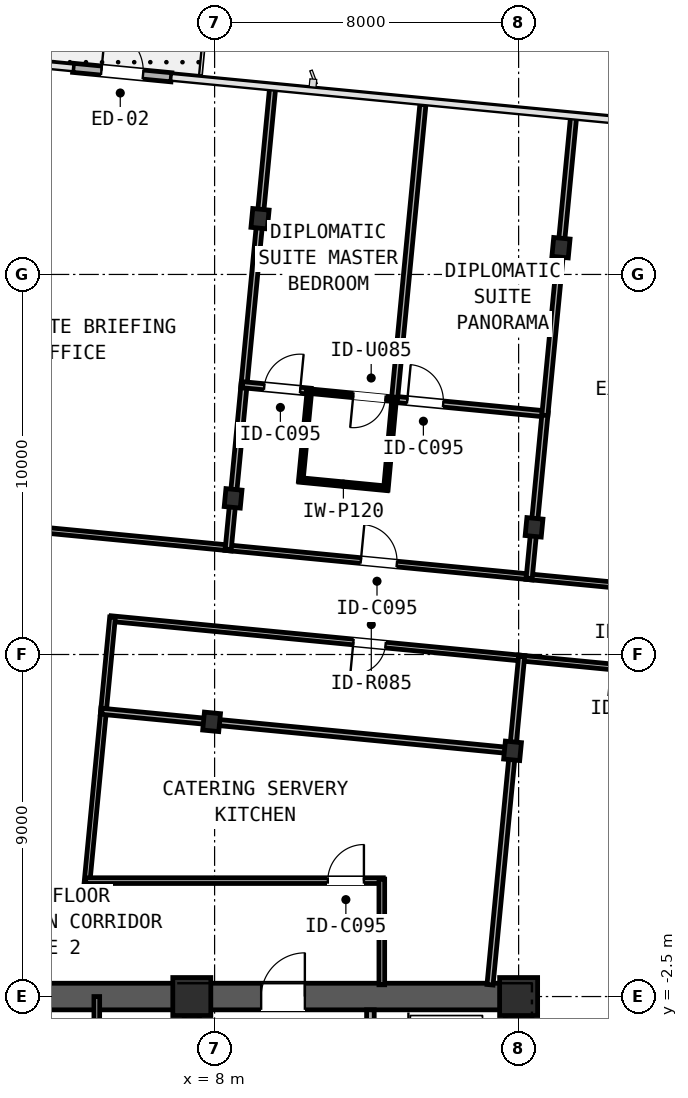
"""IFC4 building model, lengths in metres.
Left out: names, types, materials, properties, quantities, classifications, styles, units other than length and angle.
Written with IfcOpenShell. Run it as: python <this file> out.ifc"""

import sys

from ifc_helpers import new_model, si_unit, direction, frame, frame_2d, origin, origin_2d, place, context, subcontext, project, spatial, rectangle, i_section, extrude, element, fill, save


model = new_model("IFC4")
c1 = context("Model", 3, precision=1e-05, world=origin(), true_north=direction((0.0, 1.0)))
c2 = subcontext(c1, "Body", "Model", "MODEL_VIEW")
j1 = project(units=[si_unit("LENGTHUNIT", "METRE"), si_unit("PLANEANGLEUNIT", "RADIAN")], contexts=[c1])
p1 = place(None, origin())
s1 = spatial("IfcSite", under=j1, at=p1, CompositionType="ELEMENT")
p2 = place(p1, origin())
s2 = spatial("IfcBuilding", under=s1, at=p2, CompositionType="ELEMENT")
p3 = place(p2, frame((0.0, 0.0, 163.5)))
s3 = spatial("IfcBuildingStorey", under=s2, at=p3, CompositionType="ELEMENT", Elevation=163.5)
p4 = place(p3, frame((-16.35, -2.5, 0.0), z_axis=(0.0, 0.0, 1.0), x_axis=(1.0, 0.0, 0.0)))
e1 = element("IfcWall", 1, at=p4, inside=s3, PredefinedType="SHEAR", context=c2, shape_type="SweptSolid", body=[
    extrude(rectangle(XDim=32.7, YDim=0.7, at=frame_2d((16.35, 0.0))), origin(), (0.0, 0.0, 1.0), 2.91),
])
p5 = place(p4, frame((5.975, 0.0, 0.0)))
e2 = element("IfcOpeningElement", 2, at=p5, cuts=e1, PredefinedType="OPENING", context=c2, shape_type="SweptSolid", body=[
    extrude(rectangle(XDim=1.15, YDim=2.0, at=frame_2d((0.575, 1.0))), frame((0.0, 0.36, 0.0), z_axis=(0.0, -1.0, 0.0), x_axis=(1.0, 0.0, 0.0)), (0.0, 0.0, 1.0), 0.72),
])
p6 = place(p4, frame((15.55, 0.0, 0.0)))
e3 = element("IfcOpeningElement", 3, at=p6, cuts=e1, PredefinedType="OPENING", context=c2, shape_type="SweptSolid", body=[
    extrude(rectangle(XDim=1.6, YDim=2.0, at=frame_2d((0.8, 1.0))), frame((0.0, 0.36, 0.0), z_axis=(0.0, -1.0, 0.0), x_axis=(1.0, 0.0, 0.0)), (0.0, 0.0, 1.0), 0.72),
])
p7 = place(p4, frame((25.575, 0.0, 0.0)))
e4 = element("IfcOpeningElement", 4, at=p7, cuts=e1, PredefinedType="OPENING", context=c2, shape_type="SweptSolid", body=[
    extrude(rectangle(XDim=1.15, YDim=2.0, at=frame_2d((0.575, 1.0))), frame((0.0, 0.36, 0.0), z_axis=(0.0, -1.0, 0.0), x_axis=(1.0, 0.0, 0.0)), (0.0, 0.0, 1.0), 0.72),
])
p8 = place(p3, frame((16.0, -12.65, 0.0), z_axis=(0.0, 0.0, 1.0), x_axis=(0.0, 1.0, 0.0)))
e5 = element("IfcWall", 5, at=p8, inside=s3, PredefinedType="SHEAR", context=c2, shape_type="SweptSolid", body=[
    extrude(rectangle(XDim=9.8, YDim=0.7, at=frame_2d((4.9, 0.0))), origin(), (0.0, 0.0, 1.0), 2.91),
])
p9 = place(p3, frame((7.4, -12.65, 0.0), z_axis=(0.0, 0.0, 1.0), x_axis=(0.0, 1.0, 0.0)))
e6 = element("IfcWall", 6, at=p9, inside=s3, PredefinedType="SHEAR", context=c2, shape_type="SweptSolid", body=[
    extrude(rectangle(XDim=9.8, YDim=0.4, at=frame_2d((4.9, 0.0))), origin(), (0.0, 0.0, 1.0), 3.19),
])
for number, where, z_axis, x_axis in (
    (7, (7.4, -2.5, 0.0), (0.0, 0.0, 1.0), (1.0, 0.0, 0.0)),
    (8, (16.0, -2.5, 0.0), (0.0, 0.0, 1.0), (1.0, 0.0, 0.0)),
):
    element("IfcColumn", number, at=place(p3, frame(where, z_axis=z_axis, x_axis=x_axis)), inside=s3, PredefinedType="COLUMN", context=c2, shape_type="SweptSolid", body=[
        extrude(rectangle(XDim=1.0, YDim=1.0, at=origin_2d()), origin(), (0.0, 0.0, 1.0), 3.45),
    ])
for number, where, z_axis, x_axis in (
    (9, (7.921, 4.728, 0.0), (0.0, 0.0, 1.0), (0.995, -0.096, 0.0)),
    (10, (8.487, 10.609, 0.0), (0.0, 0.0, 1.0), (0.995, -0.096, 0.0)),
):
    element("IfcColumn", number, at=place(p3, frame(where, z_axis=z_axis, x_axis=x_axis)), inside=s3, PredefinedType="COLUMN", context=c2, shape_type="SweptSolid", body=[
        extrude(i_section(OverallWidth=0.424, OverallDepth=0.474, WebThickness=0.048, FlangeThickness=0.077, FilletRadius=0.031, at=origin_2d()), origin(), (0.0, 0.0, 1.0), 3.45),
    ])
p10 = place(p3, frame((9.195, 17.967, 0.0), z_axis=(0.0, 0.0, 1.0), x_axis=(0.995396198367, -0.09584575252, 0.0)))
e11 = element("IfcColumn", 11, at=p10, inside=s3, PredefinedType="COLUMN", context=c2, shape_type="SweptSolid", body=[
    extrude(i_section(OverallWidth=0.432, OverallDepth=0.498, WebThickness=0.056, FlangeThickness=0.089, FilletRadius=0.031, at=origin_2d()), origin(), (0.0, 0.0, 1.0), 3.45),
])
for number, where, z_axis, x_axis in (
    (12, (15.84, 3.965, 0.0), (0.0, 0.0, 1.0), (0.995, -0.096, 0.0)),
    (13, (16.406, 9.846, 0.0), (0.0, 0.0, 1.0), (0.995, -0.096, 0.0)),
):
    element("IfcColumn", number, at=place(p3, frame(where, z_axis=z_axis, x_axis=x_axis)), inside=s3, PredefinedType="COLUMN", context=c2, shape_type="SweptSolid", body=[
        extrude(i_section(OverallWidth=0.424, OverallDepth=0.474, WebThickness=0.048, FlangeThickness=0.077, FilletRadius=0.031, at=origin_2d()), origin(), (0.0, 0.0, 1.0), 3.45),
    ])
p11 = place(p3, frame((17.115, 17.204, 0.0), z_axis=(0.0, 0.0, 1.0), x_axis=(0.995396198367, -0.09584575252, 0.0)))
e14 = element("IfcColumn", 14, at=p11, inside=s3, PredefinedType="COLUMN", context=c2, shape_type="SweptSolid", body=[
    extrude(i_section(OverallWidth=0.432, OverallDepth=0.498, WebThickness=0.056, FlangeThickness=0.089, FilletRadius=0.031, at=origin_2d()), origin(), (0.0, 0.0, 1.0), 3.45),
])
p12 = place(p3, frame((4.275, 21.937, 0.0), z_axis=(0.0, 0.0, 1.0), x_axis=(0.995394049959, -0.095868061976, 0.0)))
e15 = element("IfcWall", 15, at=p12, inside=s3, PredefinedType="STANDARD", context=c2, shape_type="SweptSolid", body=[
    extrude(rectangle(XDim=2.6, YDim=0.24, at=frame_2d((1.3, 0.0))), origin(), (0.0, 0.0, 1.0), 3.19),
])
p13 = place(p12, frame((0.75, 0.0, 0.0)))
e16 = element("IfcOpeningElement", 16, at=p13, cuts=e15, PredefinedType="OPENING", context=c2, shape_type="SweptSolid", body=[
    extrude(rectangle(XDim=1.1, YDim=2.15, at=frame_2d((0.55, 1.075))), frame((0.0, 0.13, 0.0), z_axis=(0.0, -1.0, 0.0), x_axis=(1.0, 0.0, 0.0)), (0.0, 0.0, 1.0), 0.26),
])
p14 = place(p3, frame((12.1, -5.2, 0.0), z_axis=(0.0, 0.0, 1.0), x_axis=(0.0, 1.0, 0.0)))
e17 = element("IfcWall", 17, at=p14, inside=s3, PredefinedType="PARTITIONING", context=c2, shape_type="SweptSolid", body=[
    extrude(rectangle(XDim=2.35, YDim=0.2, at=frame_2d((1.175, 0.0))), origin(), (0.0, 0.0, 1.0), 2.225),
])
p15 = place(p14, frame((0.825, 0.0, 0.0)))
e18 = element("IfcOpeningElement", 18, at=p15, cuts=e17, PredefinedType="OPENING", context=c2, shape_type="SweptSolid", body=[
    extrude(rectangle(XDim=0.85, YDim=2.05, at=frame_2d((0.425, 1.025))), frame((0.0, 0.11, 0.0), z_axis=(0.0, -1.0, 0.0), x_axis=(1.0, 0.0, 0.0)), (0.0, 0.0, 1.0), 0.22),
])
p16 = place(p3, frame((4.9, -6.0, 0.0), z_axis=(0.0, 0.0, 1.0), x_axis=(0.0, 1.0, 0.0)))
e19 = element("IfcWall", 19, at=p16, inside=s3, PredefinedType="PARTITIONING", context=c2, shape_type="SweptSolid", body=[
    extrude(rectangle(XDim=3.5, YDim=0.15, at=frame_2d((1.75, 0.0))), origin(), (0.0, 0.0, 1.0), 2.225),
])
p17 = place(p3, frame((-7.559, 10.84, 0.0), z_axis=(0.0, 0.0, 1.0), x_axis=(0.995396443768, -0.095843203903, 0.0)))
e20 = element("IfcWall", 20, at=p17, inside=s3, PredefinedType="PARTITIONING", context=c2, shape_type="SweptSolid", body=[
    extrude(rectangle(XDim=16.076, YDim=0.15, at=frame_2d((8.038, 0.0))), origin(), (0.0, 0.0, 1.0), 2.479),
])
p18 = place(p17, frame((3.532, 0.0, 0.0)))
e21 = element("IfcOpeningElement", 21, at=p18, cuts=e20, PredefinedType="OPENING", context=c2, shape_type="SweptSolid", body=[
    extrude(rectangle(XDim=0.95, YDim=2.15, at=frame_2d((0.475, 1.075))), frame((0.0, 0.085, 0.0), z_axis=(0.0, -1.0, 0.0), x_axis=(1.0, 0.0, 0.0)), (0.0, 0.0, 1.0), 0.17),
])
p19 = place(p3, frame((8.28, 9.314, 0.0), z_axis=(0.0, 0.0, 1.0), x_axis=(0.995395467524, -0.095853342309, 0.0)))
e22 = element("IfcWall", 22, at=p19, inside=s3, PredefinedType="PARTITIONING", context=c2, shape_type="SweptSolid", body=[
    extrude(rectangle(XDim=8.12, YDim=0.15, at=frame_2d((4.06, 0.0))), origin(), (0.0, 0.0, 1.0), 2.479),
])
p20 = place(p19, frame((3.585, 0.0, 0.0)))
e23 = element("IfcOpeningElement", 23, at=p20, cuts=e22, PredefinedType="OPENING", context=c2, shape_type="SweptSolid", body=[
    extrude(rectangle(XDim=0.95, YDim=2.15, at=frame_2d((0.475, 1.075))), frame((0.0, 0.085, 0.0), z_axis=(0.0, -1.0, 0.0), x_axis=(1.0, 0.0, 0.0)), (0.0, 0.0, 1.0), 0.17),
])
p21 = place(p3, frame((16.199, 8.552, 0.0), z_axis=(0.0, 0.0, 1.0), x_axis=(0.995391104887, -0.095898635608, 0.0)))
e24 = element("IfcWall", 24, at=p21, inside=s3, PredefinedType="PARTITIONING", context=c2, shape_type="SweptSolid", body=[
    extrude(rectangle(XDim=3.722, YDim=0.15, at=frame_2d((1.861, 0.0))), origin(), (0.0, 0.0, 1.0), 2.479),
])
p22 = place(p21, frame((2.457, 0.0, 0.0)))
e25 = element("IfcOpeningElement", 25, at=p22, cuts=e24, PredefinedType="OPENING", context=c2, shape_type="SweptSolid", body=[
    extrude(rectangle(XDim=0.95, YDim=2.15, at=frame_2d((0.475, 1.075))), frame((0.0, 0.085, 0.0), z_axis=(0.0, -1.0, 0.0), x_axis=(1.0, 0.0, 0.0)), (0.0, 0.0, 1.0), 0.17),
])
p23 = place(p3, frame((16.156, 6.396, 0.0), z_axis=(0.0, 0.0, 1.0), x_axis=(-0.99539478422, 0.095860437863, 0.0)))
e26 = element("IfcWall", 26, at=p23, inside=s3, PredefinedType="PARTITIONING", context=c2, shape_type="SweptSolid", body=[
    extrude(rectangle(XDim=10.936, YDim=0.15, at=frame_2d((5.468, 0.0))), origin(), (0.0, 0.0, 1.0), 2.479),
])
p24 = place(p23, frame((3.675, 0.0, 0.0)))
e27 = element("IfcOpeningElement", 27, at=p24, cuts=e26, PredefinedType="OPENING", context=c2, shape_type="SweptSolid", body=[
    extrude(rectangle(XDim=0.85, YDim=2.05, at=frame_2d((0.425, 1.025))), frame((0.0, 0.085, 0.0), z_axis=(0.0, -1.0, 0.0), x_axis=(1.0, 0.0, 0.0)), (0.0, 0.0, 1.0), 0.17),
])
p25 = place(p3, frame((5.314, 7.48, 0.0), z_axis=(0.0, 0.0, 1.0), x_axis=(-0.09587519517, -0.995393362923, 0.0)))
e28 = element("IfcWall", 28, at=p25, inside=s3, PredefinedType="PARTITIONING", context=c2, shape_type="SweptSolid", body=[
    extrude(rectangle(XDim=2.572, YDim=0.15, at=frame_2d((1.286, 0.0))), origin(), (0.0, 0.0, 1.0), 2.479),
])
p26 = place(p3, frame((5.084, 5.083, 0.0), z_axis=(0.0, 0.0, 1.0), x_axis=(-0.095867331855, -0.995394120277, 0.0)))
e29 = element("IfcWall", 29, at=p26, inside=s3, PredefinedType="PARTITIONING", context=c2, shape_type="SweptSolid", body=[
    extrude(rectangle(XDim=4.594, YDim=0.15, at=frame_2d((2.297, 0.0))), origin(), (0.0, 0.0, 1.0), 2.479),
])
p27 = place(p3, frame((4.607, 0.55, 0.0), z_axis=(0.0, 0.0, 1.0), x_axis=(1.0, 0.0, 0.0)))
e30 = element("IfcWall", 30, at=p27, inside=s3, PredefinedType="PARTITIONING", context=c2, shape_type="SweptSolid", body=[
    extrude(rectangle(XDim=7.833, YDim=0.15, at=frame_2d((3.917, 0.0))), origin(), (0.0, 0.0, 1.0), 2.479),
])
p28 = place(p27, frame((6.372, 0.0, 0.0)))
e31 = element("IfcOpeningElement", 31, at=p28, cuts=e30, PredefinedType="OPENING", context=c2, shape_type="SweptSolid", body=[
    extrude(rectangle(XDim=0.95, YDim=2.15, at=frame_2d((0.475, 1.075))), frame((0.0, 0.085, 0.0), z_axis=(0.0, -1.0, 0.0), x_axis=(1.0, 0.0, 0.0)), (0.0, 0.0, 1.0), 0.17),
])
p29 = place(p3, frame((12.4, 0.59, 0.0), z_axis=(0.0, 0.0, 1.0), x_axis=(0.0, -1.0, 0.0)))
e32 = element("IfcWall", 32, at=p29, inside=s3, PredefinedType="PARTITIONING", context=c2, shape_type="SweptSolid", body=[
    extrude(rectangle(XDim=2.78, YDim=0.15, at=frame_2d((1.39, 0.0))), origin(), (0.0, 0.0, 1.0), 2.225),
])
p30 = place(p3, frame((19.698, 6.055, 0.0), z_axis=(0.0, 0.0, 1.0), x_axis=(-0.995397364202, 0.095833644092, 0.0)))
e33 = element("IfcWall", 33, at=p30, inside=s3, PredefinedType="PARTITIONING", context=c2, shape_type="SweptSolid", body=[
    extrude(rectangle(XDim=3.722, YDim=0.15, at=frame_2d((1.861, 0.0))), origin(), (0.0, 0.0, 1.0), 2.479),
])
p31 = place(p30, frame((0.315, 0.0, 0.0)))
e34 = element("IfcOpeningElement", 34, at=p31, cuts=e33, PredefinedType="OPENING", context=c2, shape_type="SweptSolid", body=[
    extrude(rectangle(XDim=0.95, YDim=2.15, at=frame_2d((0.475, 1.075))), frame((0.0, 0.085, 0.0), z_axis=(0.0, -1.0, 0.0), x_axis=(1.0, 0.0, 0.0)), (0.0, 0.0, 1.0), 0.17),
])
p32 = place(p3, frame((8.47, 10.433, 0.0), z_axis=(0.0, 0.0, 1.0), x_axis=(-0.095831494917, -0.995397571115, 0.0)))
e35 = element("IfcWall", 35, at=p32, inside=s3, PredefinedType="PARTITIONING", context=c2, shape_type="SweptSolid", body=[
    extrude(rectangle(XDim=1.172, YDim=0.16, at=frame_2d((0.586, 0.0))), origin(), (0.0, 0.0, 1.0), 2.479),
])
p33 = place(p3, frame((8.782, 13.677, 0.0), z_axis=(0.0, 0.0, 1.0), x_axis=(-0.095851667856, -0.995395628767, 0.0)))
e36 = element("IfcWall", 36, at=p33, inside=s3, PredefinedType="PARTITIONING", context=c2, shape_type="SweptSolid", body=[
    extrude(rectangle(XDim=2.906, YDim=0.16, at=frame_2d((1.453, 0.0))), origin(), (0.0, 0.0, 1.0), 2.479),
])
p34 = place(p3, frame((9.178, 17.791, 0.0), z_axis=(0.0, 0.0, 1.0), x_axis=(-0.095830387623, -0.995397677719, 0.0)))
e37 = element("IfcWall", 37, at=p34, inside=s3, PredefinedType="PARTITIONING", context=c2, shape_type="SweptSolid", body=[
    extrude(rectangle(XDim=4.298, YDim=0.16, at=frame_2d((2.149, 0.0))), origin(), (0.0, 0.0, 1.0), 2.479),
])
p35 = place(p3, frame((9.533, 21.47, 0.0), z_axis=(0.0, 0.0, 1.0), x_axis=(-0.095859866796, -0.995394839216, 0.0)))
e38 = element("IfcWall", 38, at=p35, inside=s3, PredefinedType="PARTITIONING", context=c2, shape_type="SweptSolid", body=[
    extrude(rectangle(XDim=3.344, YDim=0.16, at=frame_2d((1.672, 0.0))), origin(), (0.0, 0.0, 1.0), 3.19),
])
p36 = place(p3, frame((8.735, 13.599, 0.0), z_axis=(0.0, 0.0, 1.0), x_axis=(0.995394173932, -0.095866774755, 0.0)))
e39 = element("IfcWall", 39, at=p36, inside=s3, PredefinedType="PARTITIONING", context=c2, shape_type="SweptSolid", body=[
    extrude(rectangle(XDim=1.808, YDim=0.16, at=frame_2d((0.904, 0.0))), origin(), (0.0, 0.0, 1.0), 2.479),
])
p37 = place(p36, frame((0.574, 0.0, 0.0)))
e40 = element("IfcOpeningElement", 40, at=p37, cuts=e39, PredefinedType="OPENING", context=c2, shape_type="SweptSolid", body=[
    extrude(rectangle(XDim=0.95, YDim=2.15, at=frame_2d((0.475, 1.075))), frame((0.0, 0.09, 0.0), z_axis=(0.0, -1.0, 0.0), x_axis=(1.0, 0.0, 0.0)), (0.0, 0.0, 1.0), 0.18),
])
p38 = place(p3, frame((12.684, 13.218, 0.0), z_axis=(0.0, 0.0, 1.0), x_axis=(0.995396485523, -0.095842770251, 0.0)))
e41 = element("IfcWall", 41, at=p38, inside=s3, PredefinedType="PARTITIONING", context=c2, shape_type="SweptSolid", body=[
    extrude(rectangle(XDim=4.068, YDim=0.16, at=frame_2d((2.034, 0.0))), origin(), (0.0, 0.0, 1.0), 2.479),
])
p39 = place(p38, frame((0.386, 0.0, 0.0)))
e42 = element("IfcOpeningElement", 42, at=p39, cuts=e41, PredefinedType="OPENING", context=c2, shape_type="SweptSolid", body=[
    extrude(rectangle(XDim=0.95, YDim=2.15, at=frame_2d((0.475, 1.075))), frame((0.0, 0.09, 0.0), z_axis=(0.0, -1.0, 0.0), x_axis=(1.0, 0.0, 0.0)), (0.0, 0.0, 1.0), 0.18),
])
p40 = place(p3, frame((10.498, 13.469, 0.0), z_axis=(0.0, 0.0, 1.0), x_axis=(-0.095842578202, -0.995396504014, 0.0)))
e43 = element("IfcWall", 43, at=p40, inside=s3, PredefinedType="PARTITIONING", context=c2, shape_type="SweptSolid", body=[
    extrude(rectangle(XDim=2.43, YDim=0.12, at=frame_2d((1.215, 0.0))), origin(), (0.0, 0.0, 1.0), 3.19),
])
p41 = place(p3, frame((10.229, 11.094, 0.0), z_axis=(0.0, 0.0, 1.0), x_axis=(0.995403652262, -0.095768309281, 0.0)))
e44 = element("IfcWall", 44, at=p41, inside=s3, PredefinedType="PARTITIONING", context=c2, shape_type="SweptSolid", body=[
    extrude(rectangle(XDim=2.33, YDim=0.12, at=frame_2d((1.165, 0.0))), origin(), (0.0, 0.0, 1.0), 2.718),
])
p42 = place(p3, frame((12.505, 10.834, 0.0), z_axis=(0.0, 0.0, 1.0), x_axis=(0.091622673793, 0.995793796751, 0.0)))
e45 = element("IfcWall", 45, at=p42, inside=s3, PredefinedType="PARTITIONING", context=c2, shape_type="SweptSolid", body=[
    extrude(rectangle(XDim=2.43, YDim=0.12, at=frame_2d((1.215, 0.0))), origin(), (0.0, 0.0, 1.0), 2.718),
])
p43 = place(p3, frame((16.389, 9.671, 0.0), z_axis=(0.0, 0.0, 1.0), x_axis=(-0.095811626391, -0.995399483749, 0.0)))
e46 = element("IfcWall", 46, at=p43, inside=s3, PredefinedType="PARTITIONING", context=c2, shape_type="SweptSolid", body=[
    extrude(rectangle(XDim=1.172, YDim=0.16, at=frame_2d((0.586, 0.0))), origin(), (0.0, 0.0, 1.0), 2.479),
])
p44 = place(p3, frame((16.698, 12.872, 0.0), z_axis=(0.0, 0.0, 1.0), x_axis=(-0.095899197745, -0.995391050729, 0.0)))
e47 = element("IfcWall", 47, at=p44, inside=s3, PredefinedType="PARTITIONING", context=c2, shape_type="SweptSolid", body=[
    extrude(rectangle(XDim=2.864, YDim=0.16, at=frame_2d((1.432, 0.0))), origin(), (0.0, 0.0, 1.0), 2.479),
])
p45 = place(p3, frame((13.481, 20.97, 0.0), z_axis=(0.0, 0.0, 1.0), x_axis=(-0.095851985855, -0.995395598146, 0.0)))
e48 = element("IfcWall", 48, at=p45, inside=s3, PredefinedType="PARTITIONING", context=c2, shape_type="SweptSolid", body=[
    extrude(rectangle(XDim=7.832, YDim=0.16, at=frame_2d((3.916, 0.0))), origin(), (0.0, 0.0, 1.0), 2.558),
])
p46 = place(p3, frame((12.774, 13.21, 0.0), z_axis=(0.0, 0.0, 1.0), x_axis=(-0.995398273854, 0.095824195322, 0.0)))
e49 = element("IfcWall", 49, at=p46, inside=s3, PredefinedType="PARTITIONING", context=c2, shape_type="SweptSolid", body=[
    extrude(rectangle(XDim=2.372, YDim=0.12, at=frame_2d((1.186, 0.0))), origin(), (0.0, 0.0, 1.0), 2.718),
])
p47 = place(p46, frame((0.28, 0.0, 0.0)))
e50 = element("IfcOpeningElement", 50, at=p47, cuts=e49, PredefinedType="OPENING", context=c2, shape_type="SweptSolid", body=[
    extrude(rectangle(XDim=0.85, YDim=2.1, at=frame_2d((0.425, 1.05))), frame((0.0, 0.07, 0.0), z_axis=(0.0, -1.0, 0.0), x_axis=(1.0, 0.0, 0.0)), (0.0, 0.0, 1.0), 0.14),
])
p48 = place(p3, frame((17.098, 17.029, 0.0), z_axis=(0.0, 0.0, 1.0), x_axis=(-0.095856690152, -0.995395145132, 0.0)))
e51 = element("IfcWall", 51, at=p48, inside=s3, PredefinedType="PARTITIONING", context=c2, shape_type="SweptSolid", body=[
    extrude(rectangle(XDim=4.256, YDim=0.16, at=frame_2d((2.128, 0.0))), origin(), (0.0, 0.0, 1.0), 2.479),
])
p49 = place(p3, frame((17.452, 20.708, 0.0), z_axis=(0.0, 0.0, 1.0), x_axis=(-0.095859866796, -0.995394839216, 0.0)))
e52 = element("IfcWall", 52, at=p49, inside=s3, PredefinedType="PARTITIONING", context=c2, shape_type="SweptSolid", body=[
    extrude(rectangle(XDim=3.344, YDim=0.16, at=frame_2d((1.672, 0.0))), origin(), (0.0, 0.0, 1.0), 3.19),
])
p50 = place(p3, frame((7.745, 4.745, 0.0), z_axis=(0.0, 0.0, 1.0), x_axis=(-0.995392910691, 0.095879890208, 0.0)))
e53 = element("IfcWall", 53, at=p50, inside=s3, PredefinedType="PARTITIONING", context=c2, shape_type="SweptSolid", body=[
    extrude(rectangle(XDim=2.722, YDim=0.16, at=frame_2d((1.361, 0.0))), origin(), (0.0, 0.0, 1.0), 2.479),
])
p51 = place(p3, frame((15.665, 3.982, 0.0), z_axis=(0.0, 0.0, 1.0), x_axis=(-0.995396667246, 0.095840882902, 0.0)))
e54 = element("IfcWall", 54, at=p51, inside=s3, PredefinedType="PARTITIONING", context=c2, shape_type="SweptSolid", body=[
    extrude(rectangle(XDim=7.604, YDim=0.16, at=frame_2d((3.802, 0.0))), origin(), (0.0, 0.0, 1.0), 2.479),
])
p52 = place(p3, frame((16.079, 6.444, 0.0), z_axis=(0.0, 0.0, 1.0), x_axis=(-0.095794827695, -0.995401100555, 0.0)))
e55 = element("IfcWall", 55, at=p52, inside=s3, PredefinedType="PARTITIONING", context=c2, shape_type="SweptSolid", body=[
    extrude(rectangle(XDim=2.314, YDim=0.16, at=frame_2d((1.157, 0.0))), origin(), (0.0, 0.0, 1.0), 2.479),
])
p53 = place(p3, frame((15.823, 3.79, 0.0), z_axis=(0.0, 0.0, 1.0), x_axis=(-0.095865726078, -0.99539427493, 0.0)))
e56 = element("IfcWall", 56, at=p53, inside=s3, PredefinedType="PARTITIONING", context=c2, shape_type="SweptSolid", body=[
    extrude(rectangle(XDim=6.008, YDim=0.16, at=frame_2d((3.004, 0.0))), origin(), (0.0, 0.0, 1.0), 2.225),
])
p54 = place(p13, origin())
e57 = element("IfcDoor", 57, at=p54, inside=s3, OperationType="SINGLE_SWING_LEFT", PredefinedType="DOOR", context=c2, shape_type="SweptSolid", body=[
    extrude(rectangle(XDim=1.1, YDim=2.15, at=frame_2d((0.55, 1.075))), frame((0.0, 0.025, 0.0), z_axis=(0.0, -1.0, 0.0), x_axis=(1.0, 0.0, 0.0)), (0.0, 0.0, 1.0), 0.05),
])
fill(e16, e57)
p55 = place(p7, origin())
e58 = element("IfcDoor", 58, at=p55, inside=s3, OperationType="SINGLE_SWING_RIGHT", PredefinedType="DOOR", context=c2, shape_type="SweptSolid", body=[
    extrude(rectangle(XDim=1.15, YDim=2.0, at=frame_2d((0.575, 1.0))), frame((0.0, 0.025, 0.0), z_axis=(0.0, -1.0, 0.0), x_axis=(1.0, 0.0, 0.0)), (0.0, 0.0, 1.0), 0.05),
])
fill(e4, e58)
p56 = place(p20, frame((0.95, 0.0, 0.0), z_axis=(0.0, 0.0, 1.0), x_axis=(-1.0, 0.0, 0.0)))
e59 = element("IfcDoor", 59, at=p56, inside=s3, OperationType="SINGLE_SWING_LEFT", PredefinedType="DOOR", context=c2, shape_type="SweptSolid", body=[
    extrude(rectangle(XDim=0.95, YDim=2.15, at=frame_2d((0.475, 1.075))), frame((0.0, 0.025, 0.0), z_axis=(0.0, -1.0, 0.0), x_axis=(1.0, 0.0, 0.0)), (0.0, 0.0, 1.0), 0.05),
])
fill(e23, e59)
p57 = place(p37, origin())
e60 = element("IfcDoor", 60, at=p57, inside=s3, OperationType="SINGLE_SWING_RIGHT", PredefinedType="DOOR", context=c2, shape_type="SweptSolid", body=[
    extrude(rectangle(XDim=0.95, YDim=2.15, at=frame_2d((0.475, 1.075))), frame((0.0, 0.025, 0.0), z_axis=(0.0, -1.0, 0.0), x_axis=(1.0, 0.0, 0.0)), (0.0, 0.0, 1.0), 0.05),
])
fill(e40, e60)
p58 = place(p39, origin())
e61 = element("IfcDoor", 61, at=p58, inside=s3, OperationType="SINGLE_SWING_LEFT", PredefinedType="DOOR", context=c2, shape_type="SweptSolid", body=[
    extrude(rectangle(XDim=0.95, YDim=2.15, at=frame_2d((0.475, 1.075))), frame((0.0, 0.025, 0.0), z_axis=(0.0, -1.0, 0.0), x_axis=(1.0, 0.0, 0.0)), (0.0, 0.0, 1.0), 0.05),
])
fill(e42, e61)
p59 = place(p47, frame((0.85, 0.0, 0.0), z_axis=(0.0, 0.0, 1.0), x_axis=(-1.0, 0.0, 0.0)))
e62 = element("IfcDoor", 62, at=p59, inside=s3, OperationType="SINGLE_SWING_RIGHT", PredefinedType="DOOR", context=c2, shape_type="SweptSolid", body=[
    extrude(rectangle(XDim=0.85, YDim=2.1, at=frame_2d((0.425, 1.05))), frame((0.0, 0.025, 0.0), z_axis=(0.0, -1.0, 0.0), x_axis=(1.0, 0.0, 0.0)), (0.0, 0.0, 1.0), 0.05),
])
fill(e50, e62)
p60 = place(p24, frame((0.85, 0.0, 0.0), z_axis=(0.0, 0.0, 1.0), x_axis=(-1.0, 0.0, 0.0)))
e63 = element("IfcDoor", 63, at=p60, inside=s3, OperationType="SINGLE_SWING_RIGHT", PredefinedType="DOOR", context=c2, shape_type="SweptSolid", body=[
    extrude(rectangle(XDim=0.85, YDim=2.05, at=frame_2d((0.425, 1.025))), frame((0.0, 0.025, 0.0), z_axis=(0.0, -1.0, 0.0), x_axis=(1.0, 0.0, 0.0)), (0.0, 0.0, 1.0), 0.05),
])
fill(e27, e63)
p61 = place(p28, origin())
e64 = element("IfcDoor", 64, at=p61, inside=s3, OperationType="SINGLE_SWING_RIGHT", PredefinedType="DOOR", context=c2, shape_type="SweptSolid", body=[
    extrude(rectangle(XDim=0.95, YDim=2.15, at=frame_2d((0.475, 1.075))), frame((0.0, 0.025, 0.0), z_axis=(0.0, -1.0, 0.0), x_axis=(1.0, 0.0, 0.0)), (0.0, 0.0, 1.0), 0.05),
])
fill(e31, e64)
save(model, sys.argv[1])
